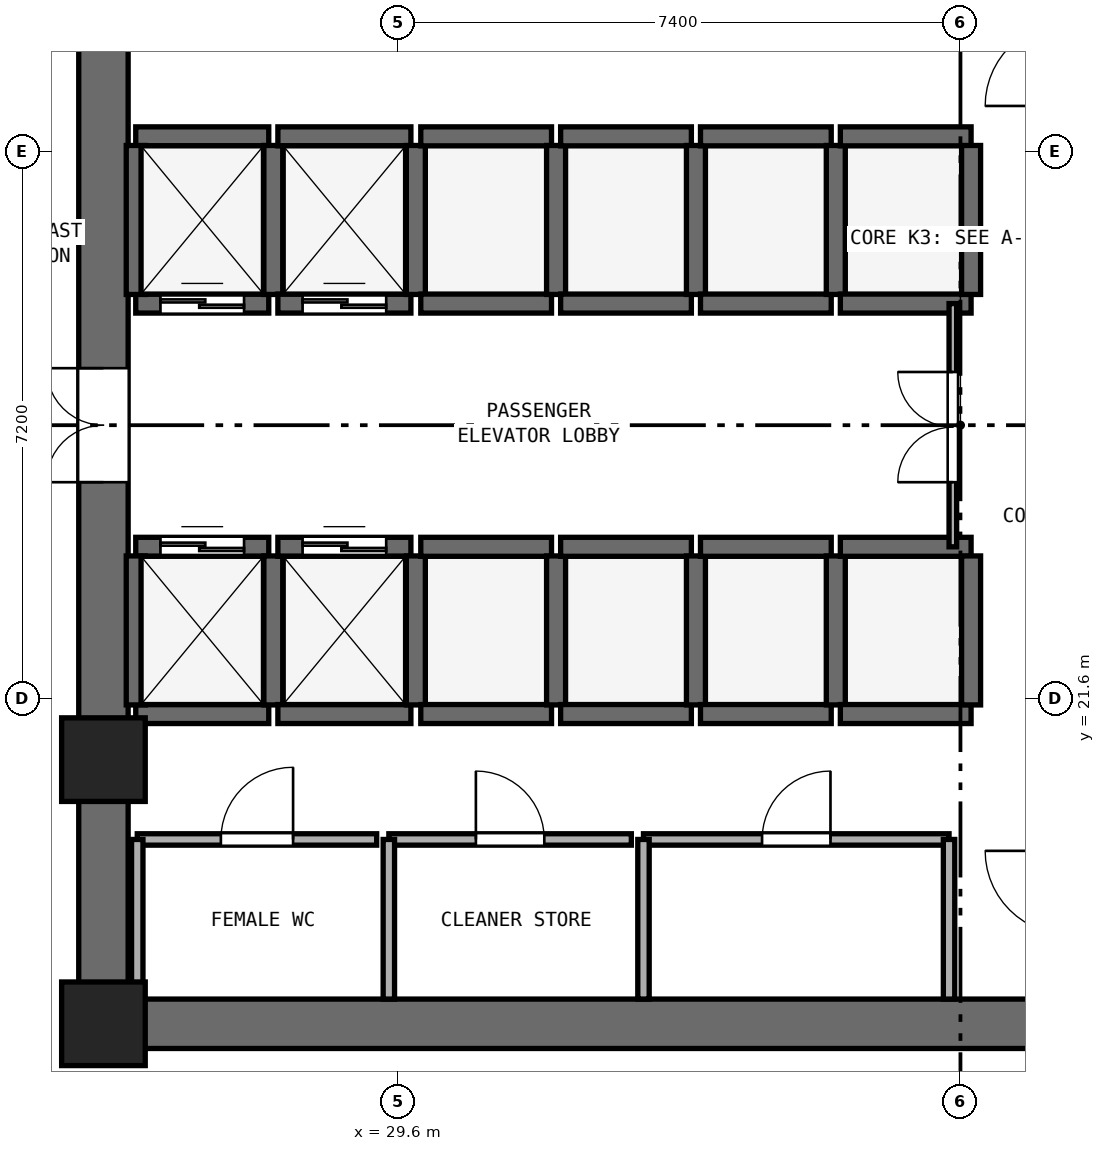
"""IFC4 building model, lengths in metres.
Left out: names, types, materials, properties, quantities, classifications, styles, units other than length and angle.
Written with IfcOpenShell. Run it as: python <this file> out.ifc"""

import sys

from ifc_helpers import new_model, si_unit, direction, frame, frame_2d, origin, origin_2d, place, context, subcontext, project, spatial, rectangle, extrude, element, fill, save


model = new_model("IFC4")
c1 = context("Model", 3, precision=1e-05, world=origin(), true_north=direction((0.0, 1.0)))
c2 = subcontext(c1, "Body", "Model", "MODEL_VIEW")
j1 = project(units=[si_unit("LENGTHUNIT", "METRE"), si_unit("PLANEANGLEUNIT", "RADIAN")], contexts=[c1])
p1 = place(None, origin())
s1 = spatial("IfcSite", under=j1, at=p1, CompositionType="ELEMENT")
p2 = place(p1, origin())
s2 = spatial("IfcBuilding", under=s1, at=p2, CompositionType="ELEMENT")
p3 = place(p2, frame((0.0, 0.0, 85.8)))
s3 = spatial("IfcBuildingStorey", under=s2, at=p3, CompositionType="ELEMENT", Elevation=85.8)
p4 = place(p3, frame((25.4, 17.325, 0.0), z_axis=(0.0, 0.0, 1.0), x_axis=(1.0, 0.0, 0.0)))
e1 = element("IfcWall", 1, at=p4, inside=s3, PredefinedType="SHEAR", context=c2, shape_type="SweptSolid", body=[
    extrude(rectangle(XDim=23.2, YDim=0.65, at=frame_2d((11.6, 0.0))), origin(), (0.0, 0.0, 1.0), 3.525),
])
p5 = place(p3, frame((25.725, 17.65, 0.0), z_axis=(0.0, 0.0, 1.0), x_axis=(0.0, 1.0, 0.0)))
e2 = element("IfcWall", 2, at=p5, inside=s3, PredefinedType="SHEAR", context=c2, shape_type="SweptSolid", body=[
    extrude(rectangle(XDim=15.1, YDim=0.65, at=frame_2d((7.55, 0.0))), origin(), (0.0, 0.0, 1.0), 3.525),
])
p6 = place(p5, frame((6.8, 0.0, 0.0)))
e3 = element("IfcOpeningElement", 3, at=p6, cuts=e2, PredefinedType="OPENING", context=c2, shape_type="SweptSolid", body=[
    extrude(rectangle(XDim=1.5, YDim=2.15, at=frame_2d((0.75, 1.075))), frame((0.0, 0.335, 0.0), z_axis=(0.0, -1.0, 0.0), x_axis=(1.0, 0.0, 0.0)), (0.0, 0.0, 1.0), 0.67),
])
for number, where, z_axis, x_axis in (
    (4, (25.725, 17.325, 0.0), (0.0, 0.0, 1.0), (1.0, 0.0, 0.0)),
    (5, (25.725, 20.8, 0.0), (0.0, 0.0, 1.0), (1.0, 0.0, 0.0)),
):
    element("IfcColumn", number, at=place(p3, frame(where, z_axis=z_axis, x_axis=x_axis)), inside=s3, PredefinedType="PILASTER", context=c2, shape_type="SweptSolid", body=[
        extrude(rectangle(XDim=1.1, YDim=1.1, at=origin_2d()), origin(), (0.0, 0.0, 1.0), 3.8),
    ])
p7 = place(p3, frame((26.15, 26.8, 0.0), z_axis=(0.0, 0.0, 1.0), x_axis=(1.0, 0.0, 0.0)))
e6 = element("IfcWall", 6, at=p7, inside=s3, PredefinedType="SHEAR", context=c2, shape_type="SweptSolid", body=[
    extrude(rectangle(XDim=1.75, YDim=0.25, at=frame_2d((0.875, 0.0))), origin(), (0.0, 0.0, 1.0), 3.525),
])
p8 = place(p7, frame((0.325, 0.0, 0.0)))
e7 = element("IfcOpeningElement", 7, at=p8, cuts=e6, PredefinedType="OPENING", context=c2, shape_type="SweptSolid", body=[
    extrude(rectangle(XDim=1.1, YDim=2.15, at=frame_2d((0.55, 1.075))), frame((0.0, 0.135, 0.0), z_axis=(0.0, -1.0, 0.0), x_axis=(1.0, 0.0, 0.0)), (0.0, 0.0, 1.0), 0.27),
])
p9 = place(p3, frame((26.15, 29.0, 0.0), z_axis=(0.0, 0.0, 1.0), x_axis=(1.0, 0.0, 0.0)))
e8 = element("IfcWall", 8, at=p9, inside=s3, PredefinedType="SHEAR", context=c2, shape_type="SweptSolid", body=[
    extrude(rectangle(XDim=1.75, YDim=0.25, at=frame_2d((0.875, 0.0))), origin(), (0.0, 0.0, 1.0), 3.525),
])
for number, where, z_axis, x_axis in (
    (9, (26.15, 26.92, 0.0), (0.0, 0.0, 1.0), (0.0, 1.0, 0.0)),
    (10, (27.96, 26.92, 0.0), (0.0, 0.0, 1.0), (0.0, 1.0, 0.0)),
):
    element("IfcWall", number, at=place(p3, frame(where, z_axis=z_axis, x_axis=x_axis)), inside=s3, PredefinedType="SHEAR", context=c2, shape_type="SweptSolid", body=[
        extrude(rectangle(XDim=1.96, YDim=0.25, at=frame_2d((0.98, 0.0))), origin(), (0.0, 0.0, 1.0), 3.525),
    ])
p10 = place(p3, frame((28.02, 26.8, 0.0), z_axis=(0.0, 0.0, 1.0), x_axis=(1.0, 0.0, 0.0)))
e11 = element("IfcWall", 11, at=p10, inside=s3, PredefinedType="SHEAR", context=c2, shape_type="SweptSolid", body=[
    extrude(rectangle(XDim=1.75, YDim=0.25, at=frame_2d((0.875, 0.0))), origin(), (0.0, 0.0, 1.0), 3.525),
])
p11 = place(p10, frame((0.325, 0.0, 0.0)))
e12 = element("IfcOpeningElement", 12, at=p11, cuts=e11, PredefinedType="OPENING", context=c2, shape_type="SweptSolid", body=[
    extrude(rectangle(XDim=1.1, YDim=2.15, at=frame_2d((0.55, 1.075))), frame((0.0, 0.135, 0.0), z_axis=(0.0, -1.0, 0.0), x_axis=(1.0, 0.0, 0.0)), (0.0, 0.0, 1.0), 0.27),
])
p12 = place(p3, frame((28.02, 29.0, 0.0), z_axis=(0.0, 0.0, 1.0), x_axis=(1.0, 0.0, 0.0)))
e13 = element("IfcWall", 13, at=p12, inside=s3, PredefinedType="SHEAR", context=c2, shape_type="SweptSolid", body=[
    extrude(rectangle(XDim=1.75, YDim=0.25, at=frame_2d((0.875, 0.0))), origin(), (0.0, 0.0, 1.0), 3.525),
])
p13 = place(p3, frame((29.835, 26.92, 0.0), z_axis=(0.0, 0.0, 1.0), x_axis=(0.0, 1.0, 0.0)))
e14 = element("IfcWall", 14, at=p13, inside=s3, PredefinedType="SHEAR", context=c2, shape_type="SweptSolid", body=[
    extrude(rectangle(XDim=1.96, YDim=0.25, at=frame_2d((0.98, 0.0))), origin(), (0.0, 0.0, 1.0), 3.525),
])
p14 = place(p3, frame((26.15, 21.4, 0.0), z_axis=(0.0, 0.0, 1.0), x_axis=(1.0, 0.0, 0.0)))
e15 = element("IfcWall", 15, at=p14, inside=s3, PredefinedType="SHEAR", context=c2, shape_type="SweptSolid", body=[
    extrude(rectangle(XDim=1.75, YDim=0.25, at=frame_2d((0.875, 0.0))), origin(), (0.0, 0.0, 1.0), 3.525),
])
p15 = place(p3, frame((26.15, 23.6, 0.0), z_axis=(0.0, 0.0, 1.0), x_axis=(1.0, 0.0, 0.0)))
e16 = element("IfcWall", 16, at=p15, inside=s3, PredefinedType="SHEAR", context=c2, shape_type="SweptSolid", body=[
    extrude(rectangle(XDim=1.75, YDim=0.25, at=frame_2d((0.875, 0.0))), origin(), (0.0, 0.0, 1.0), 3.525),
])
p16 = place(p15, frame((0.325, 0.0, 0.0)))
e17 = element("IfcOpeningElement", 17, at=p16, cuts=e16, PredefinedType="OPENING", context=c2, shape_type="SweptSolid", body=[
    extrude(rectangle(XDim=1.1, YDim=2.15, at=frame_2d((0.55, 1.075))), frame((0.0, 0.135, 0.0), z_axis=(0.0, -1.0, 0.0), x_axis=(1.0, 0.0, 0.0)), (0.0, 0.0, 1.0), 0.27),
])
for number, where, z_axis, x_axis in (
    (18, (26.15, 21.52, 0.0), (0.0, 0.0, 1.0), (0.0, 1.0, 0.0)),
    (19, (27.96, 21.52, 0.0), (0.0, 0.0, 1.0), (0.0, 1.0, 0.0)),
):
    element("IfcWall", number, at=place(p3, frame(where, z_axis=z_axis, x_axis=x_axis)), inside=s3, PredefinedType="SHEAR", context=c2, shape_type="SweptSolid", body=[
        extrude(rectangle(XDim=1.96, YDim=0.25, at=frame_2d((0.98, 0.0))), origin(), (0.0, 0.0, 1.0), 3.525),
    ])
p17 = place(p3, frame((28.02, 21.4, 0.0), z_axis=(0.0, 0.0, 1.0), x_axis=(1.0, 0.0, 0.0)))
e20 = element("IfcWall", 20, at=p17, inside=s3, PredefinedType="SHEAR", context=c2, shape_type="SweptSolid", body=[
    extrude(rectangle(XDim=1.75, YDim=0.25, at=frame_2d((0.875, 0.0))), origin(), (0.0, 0.0, 1.0), 3.525),
])
p18 = place(p3, frame((28.02, 23.6, 0.0), z_axis=(0.0, 0.0, 1.0), x_axis=(1.0, 0.0, 0.0)))
e21 = element("IfcWall", 21, at=p18, inside=s3, PredefinedType="SHEAR", context=c2, shape_type="SweptSolid", body=[
    extrude(rectangle(XDim=1.75, YDim=0.25, at=frame_2d((0.875, 0.0))), origin(), (0.0, 0.0, 1.0), 3.525),
])
p19 = place(p18, frame((0.325, 0.0, 0.0)))
e22 = element("IfcOpeningElement", 22, at=p19, cuts=e21, PredefinedType="OPENING", context=c2, shape_type="SweptSolid", body=[
    extrude(rectangle(XDim=1.1, YDim=2.15, at=frame_2d((0.55, 1.075))), frame((0.0, 0.135, 0.0), z_axis=(0.0, -1.0, 0.0), x_axis=(1.0, 0.0, 0.0)), (0.0, 0.0, 1.0), 0.27),
])
p20 = place(p3, frame((29.835, 21.52, 0.0), z_axis=(0.0, 0.0, 1.0), x_axis=(0.0, 1.0, 0.0)))
e23 = element("IfcWall", 23, at=p20, inside=s3, PredefinedType="SHEAR", context=c2, shape_type="SweptSolid", body=[
    extrude(rectangle(XDim=1.96, YDim=0.25, at=frame_2d((0.98, 0.0))), origin(), (0.0, 0.0, 1.0), 3.525),
])
for number, where, z_axis, x_axis in (
    (24, (29.9, 21.4, 0.0), (0.0, 0.0, 1.0), (1.0, 0.0, 0.0)),
    (25, (29.9, 23.6, 0.0), (0.0, 0.0, 1.0), (1.0, 0.0, 0.0)),
):
    element("IfcWall", number, at=place(p3, frame(where, z_axis=z_axis, x_axis=x_axis)), inside=s3, PredefinedType="SHEAR", context=c2, shape_type="SweptSolid", body=[
        extrude(rectangle(XDim=1.72, YDim=0.25, at=frame_2d((0.86, 0.0))), origin(), (0.0, 0.0, 1.0), 3.525),
    ])
p21 = place(p3, frame((31.68, 21.52, 0.0), z_axis=(0.0, 0.0, 1.0), x_axis=(0.0, 1.0, 0.0)))
e26 = element("IfcWall", 26, at=p21, inside=s3, PredefinedType="SHEAR", context=c2, shape_type="SweptSolid", body=[
    extrude(rectangle(XDim=1.96, YDim=0.25, at=frame_2d((0.98, 0.0))), origin(), (0.0, 0.0, 1.0), 3.525),
])
for number, where, z_axis, x_axis in (
    (27, (31.74, 21.4, 0.0), (0.0, 0.0, 1.0), (1.0, 0.0, 0.0)),
    (28, (31.74, 23.6, 0.0), (0.0, 0.0, 1.0), (1.0, 0.0, 0.0)),
):
    element("IfcWall", number, at=place(p3, frame(where, z_axis=z_axis, x_axis=x_axis)), inside=s3, PredefinedType="SHEAR", context=c2, shape_type="SweptSolid", body=[
        extrude(rectangle(XDim=1.72, YDim=0.25, at=frame_2d((0.86, 0.0))), origin(), (0.0, 0.0, 1.0), 3.525),
    ])
p22 = place(p3, frame((33.52, 21.52, 0.0), z_axis=(0.0, 0.0, 1.0), x_axis=(0.0, 1.0, 0.0)))
e29 = element("IfcWall", 29, at=p22, inside=s3, PredefinedType="SHEAR", context=c2, shape_type="SweptSolid", body=[
    extrude(rectangle(XDim=1.96, YDim=0.25, at=frame_2d((0.98, 0.0))), origin(), (0.0, 0.0, 1.0), 3.525),
])
for number, where, z_axis, x_axis in (
    (30, (33.58, 21.4, 0.0), (0.0, 0.0, 1.0), (1.0, 0.0, 0.0)),
    (31, (33.58, 23.6, 0.0), (0.0, 0.0, 1.0), (1.0, 0.0, 0.0)),
):
    element("IfcWall", number, at=place(p3, frame(where, z_axis=z_axis, x_axis=x_axis)), inside=s3, PredefinedType="SHEAR", context=c2, shape_type="SweptSolid", body=[
        extrude(rectangle(XDim=1.72, YDim=0.25, at=frame_2d((0.86, 0.0))), origin(), (0.0, 0.0, 1.0), 3.525),
    ])
p23 = place(p3, frame((35.36, 21.52, 0.0), z_axis=(0.0, 0.0, 1.0), x_axis=(0.0, 1.0, 0.0)))
e32 = element("IfcWall", 32, at=p23, inside=s3, PredefinedType="SHEAR", context=c2, shape_type="SweptSolid", body=[
    extrude(rectangle(XDim=1.96, YDim=0.25, at=frame_2d((0.98, 0.0))), origin(), (0.0, 0.0, 1.0), 3.525),
])
for number, where, z_axis, x_axis in (
    (33, (35.42, 21.4, 0.0), (0.0, 0.0, 1.0), (1.0, 0.0, 0.0)),
    (34, (35.42, 23.6, 0.0), (0.0, 0.0, 1.0), (1.0, 0.0, 0.0)),
):
    element("IfcWall", number, at=place(p3, frame(where, z_axis=z_axis, x_axis=x_axis)), inside=s3, PredefinedType="SHEAR", context=c2, shape_type="SweptSolid", body=[
        extrude(rectangle(XDim=1.72, YDim=0.25, at=frame_2d((0.86, 0.0))), origin(), (0.0, 0.0, 1.0), 3.525),
    ])
p24 = place(p3, frame((37.14, 21.52, 0.0), z_axis=(0.0, 0.0, 1.0), x_axis=(0.0, 1.0, 0.0)))
e35 = element("IfcWall", 35, at=p24, inside=s3, PredefinedType="SHEAR", context=c2, shape_type="SweptSolid", body=[
    extrude(rectangle(XDim=1.96, YDim=0.25, at=frame_2d((0.98, 0.0))), origin(), (0.0, 0.0, 1.0), 3.525),
])
for number, where, z_axis, x_axis in (
    (36, (29.9, 26.8, 0.0), (0.0, 0.0, 1.0), (1.0, 0.0, 0.0)),
    (37, (29.9, 29.0, 0.0), (0.0, 0.0, 1.0), (1.0, 0.0, 0.0)),
):
    element("IfcWall", number, at=place(p3, frame(where, z_axis=z_axis, x_axis=x_axis)), inside=s3, PredefinedType="SHEAR", context=c2, shape_type="SweptSolid", body=[
        extrude(rectangle(XDim=1.72, YDim=0.25, at=frame_2d((0.86, 0.0))), origin(), (0.0, 0.0, 1.0), 3.525),
    ])
p25 = place(p3, frame((31.68, 26.92, 0.0), z_axis=(0.0, 0.0, 1.0), x_axis=(0.0, 1.0, 0.0)))
e38 = element("IfcWall", 38, at=p25, inside=s3, PredefinedType="SHEAR", context=c2, shape_type="SweptSolid", body=[
    extrude(rectangle(XDim=1.96, YDim=0.25, at=frame_2d((0.98, 0.0))), origin(), (0.0, 0.0, 1.0), 3.525),
])
for number, where, z_axis, x_axis in (
    (39, (31.74, 26.8, 0.0), (0.0, 0.0, 1.0), (1.0, 0.0, 0.0)),
    (40, (31.74, 29.0, 0.0), (0.0, 0.0, 1.0), (1.0, 0.0, 0.0)),
):
    element("IfcWall", number, at=place(p3, frame(where, z_axis=z_axis, x_axis=x_axis)), inside=s3, PredefinedType="SHEAR", context=c2, shape_type="SweptSolid", body=[
        extrude(rectangle(XDim=1.72, YDim=0.25, at=frame_2d((0.86, 0.0))), origin(), (0.0, 0.0, 1.0), 3.525),
    ])
p26 = place(p3, frame((33.52, 26.92, 0.0), z_axis=(0.0, 0.0, 1.0), x_axis=(0.0, 1.0, 0.0)))
e41 = element("IfcWall", 41, at=p26, inside=s3, PredefinedType="SHEAR", context=c2, shape_type="SweptSolid", body=[
    extrude(rectangle(XDim=1.96, YDim=0.25, at=frame_2d((0.98, 0.0))), origin(), (0.0, 0.0, 1.0), 3.525),
])
for number, where, z_axis, x_axis in (
    (42, (33.58, 26.8, 0.0), (0.0, 0.0, 1.0), (1.0, 0.0, 0.0)),
    (43, (33.58, 29.0, 0.0), (0.0, 0.0, 1.0), (1.0, 0.0, 0.0)),
):
    element("IfcWall", number, at=place(p3, frame(where, z_axis=z_axis, x_axis=x_axis)), inside=s3, PredefinedType="SHEAR", context=c2, shape_type="SweptSolid", body=[
        extrude(rectangle(XDim=1.72, YDim=0.25, at=frame_2d((0.86, 0.0))), origin(), (0.0, 0.0, 1.0), 3.525),
    ])
p27 = place(p3, frame((35.36, 26.92, 0.0), z_axis=(0.0, 0.0, 1.0), x_axis=(0.0, 1.0, 0.0)))
e44 = element("IfcWall", 44, at=p27, inside=s3, PredefinedType="SHEAR", context=c2, shape_type="SweptSolid", body=[
    extrude(rectangle(XDim=1.96, YDim=0.25, at=frame_2d((0.98, 0.0))), origin(), (0.0, 0.0, 1.0), 3.525),
])
for number, where, z_axis, x_axis in (
    (45, (35.42, 26.8, 0.0), (0.0, 0.0, 1.0), (1.0, 0.0, 0.0)),
    (46, (35.42, 29.0, 0.0), (0.0, 0.0, 1.0), (1.0, 0.0, 0.0)),
):
    element("IfcWall", number, at=place(p3, frame(where, z_axis=z_axis, x_axis=x_axis)), inside=s3, PredefinedType="SHEAR", context=c2, shape_type="SweptSolid", body=[
        extrude(rectangle(XDim=1.72, YDim=0.25, at=frame_2d((0.86, 0.0))), origin(), (0.0, 0.0, 1.0), 3.525),
    ])
p28 = place(p3, frame((37.14, 26.92, 0.0), z_axis=(0.0, 0.0, 1.0), x_axis=(0.0, 1.0, 0.0)))
e47 = element("IfcWall", 47, at=p28, inside=s3, PredefinedType="SHEAR", context=c2, shape_type="SweptSolid", body=[
    extrude(rectangle(XDim=1.96, YDim=0.25, at=frame_2d((0.98, 0.0))), origin(), (0.0, 0.0, 1.0), 3.525),
])
p29 = place(p3, frame((26.17, 19.75, 0.0), z_axis=(0.0, 0.0, 1.0), x_axis=(1.0, 0.0, 0.0)))
e48 = element("IfcWall", 48, at=p29, inside=s3, PredefinedType="PARTITIONING", context=c2, shape_type="SweptSolid", body=[
    extrude(rectangle(XDim=3.15, YDim=0.15, at=frame_2d((1.575, 0.0))), origin(), (0.0, 0.0, 1.0), 3.525),
])
p30 = place(p29, frame((1.1, 0.0, 0.0)))
e49 = element("IfcOpeningElement", 49, at=p30, cuts=e48, PredefinedType="OPENING", context=c2, shape_type="SweptSolid", body=[
    extrude(rectangle(XDim=0.95, YDim=2.1, at=frame_2d((0.475, 1.05))), frame((0.0, 0.085, 0.0), z_axis=(0.0, -1.0, 0.0), x_axis=(1.0, 0.0, 0.0)), (0.0, 0.0, 1.0), 0.17),
])
p31 = place(p3, frame((26.17, 17.65, 0.0), z_axis=(0.0, 0.0, 1.0), x_axis=(0.0, 1.0, 0.0)))
e50 = element("IfcWall", 50, at=p31, inside=s3, PredefinedType="PARTITIONING", context=c2, shape_type="SweptSolid", body=[
    extrude(rectangle(XDim=2.1, YDim=0.15, at=frame_2d((1.05, 0.0))), origin(), (0.0, 0.0, 1.0), 3.525),
])
p32 = place(p3, frame((29.48, 19.75, 0.0), z_axis=(0.0, 0.0, 1.0), x_axis=(1.0, 0.0, 0.0)))
e51 = element("IfcWall", 51, at=p32, inside=s3, PredefinedType="PARTITIONING", context=c2, shape_type="SweptSolid", body=[
    extrude(rectangle(XDim=3.19, YDim=0.15, at=frame_2d((1.595, 0.0))), origin(), (0.0, 0.0, 1.0), 3.525),
])
p33 = place(p32, frame((1.145, 0.0, 0.0)))
e52 = element("IfcOpeningElement", 52, at=p33, cuts=e51, PredefinedType="OPENING", context=c2, shape_type="SweptSolid", body=[
    extrude(rectangle(XDim=0.9, YDim=2.1, at=frame_2d((0.45, 1.05))), frame((0.0, 0.085, 0.0), z_axis=(0.0, -1.0, 0.0), x_axis=(1.0, 0.0, 0.0)), (0.0, 0.0, 1.0), 0.17),
])
p34 = place(p3, frame((29.48, 17.65, 0.0), z_axis=(0.0, 0.0, 1.0), x_axis=(0.0, 1.0, 0.0)))
e53 = element("IfcWall", 53, at=p34, inside=s3, PredefinedType="PARTITIONING", context=c2, shape_type="SweptSolid", body=[
    extrude(rectangle(XDim=2.1, YDim=0.15, at=frame_2d((1.05, 0.0))), origin(), (0.0, 0.0, 1.0), 3.525),
])
p35 = place(p3, frame((32.83, 19.75, 0.0), z_axis=(0.0, 0.0, 1.0), x_axis=(1.0, 0.0, 0.0)))
e54 = element("IfcWall", 54, at=p35, inside=s3, PredefinedType="PARTITIONING", context=c2, shape_type="SweptSolid", body=[
    extrude(rectangle(XDim=4.02, YDim=0.15, at=frame_2d((2.01, 0.0))), origin(), (0.0, 0.0, 1.0), 3.525),
])
p36 = place(p35, frame((1.56, 0.0, 0.0)))
e55 = element("IfcOpeningElement", 55, at=p36, cuts=e54, PredefinedType="OPENING", context=c2, shape_type="SweptSolid", body=[
    extrude(rectangle(XDim=0.9, YDim=2.1, at=frame_2d((0.45, 1.05))), frame((0.0, 0.085, 0.0), z_axis=(0.0, -1.0, 0.0), x_axis=(1.0, 0.0, 0.0)), (0.0, 0.0, 1.0), 0.17),
])
for number, where, z_axis, x_axis in (
    (56, (32.83, 17.65, 0.0), (0.0, 0.0, 1.0), (0.0, 1.0, 0.0)),
    (57, (36.85, 17.65, 0.0), (0.0, 0.0, 1.0), (0.0, 1.0, 0.0)),
):
    element("IfcWall", number, at=place(p3, frame(where, z_axis=z_axis, x_axis=x_axis)), inside=s3, PredefinedType="PARTITIONING", context=c2, shape_type="SweptSolid", body=[
        extrude(rectangle(XDim=2.1, YDim=0.15, at=frame_2d((1.05, 0.0))), origin(), (0.0, 0.0, 1.0), 3.525),
    ])
p37 = place(p3, frame((36.9, 23.6, 0.0), z_axis=(0.0, 0.0, 1.0), x_axis=(0.0, 1.0, 0.0)))
e58 = element("IfcWall", 58, at=p37, inside=s3, PredefinedType="PARTITIONING", context=c2, shape_type="SweptSolid", body=[
    extrude(rectangle(XDim=3.2, YDim=0.1, at=frame_2d((1.6, 0.0))), origin(), (0.0, 0.0, 1.0), 3.525),
])
p38 = place(p37, frame((0.85, 0.0, 0.0)))
e59 = element("IfcOpeningElement", 59, at=p38, cuts=e58, PredefinedType="OPENING", context=c2, shape_type="SweptSolid", body=[
    extrude(rectangle(XDim=1.45, YDim=2.12, at=frame_2d((0.725, 1.06))), frame((0.0, 0.06, 0.0), z_axis=(0.0, -1.0, 0.0), x_axis=(1.0, 0.0, 0.0)), (0.0, 0.0, 1.0), 0.12),
])
p39 = place(p8, origin())
e60 = element("IfcDoor", 60, at=p39, inside=s3, OperationType="DOUBLE_DOOR_SLIDING", PredefinedType="DOOR", context=c2, shape_type="SweptSolid", body=[
    extrude(rectangle(XDim=1.1, YDim=2.15, at=frame_2d((0.55, 1.075))), frame((0.0, 0.025, 0.0), z_axis=(0.0, -1.0, 0.0), x_axis=(1.0, 0.0, 0.0)), (0.0, 0.0, 1.0), 0.05),
])
fill(e7, e60)
p40 = place(p11, origin())
e61 = element("IfcDoor", 61, at=p40, inside=s3, OperationType="DOUBLE_DOOR_SLIDING", PredefinedType="DOOR", context=c2, shape_type="SweptSolid", body=[
    extrude(rectangle(XDim=1.1, YDim=2.15, at=frame_2d((0.55, 1.075))), frame((0.0, 0.025, 0.0), z_axis=(0.0, -1.0, 0.0), x_axis=(1.0, 0.0, 0.0)), (0.0, 0.0, 1.0), 0.05),
])
fill(e12, e61)
p41 = place(p16, origin())
e62 = element("IfcDoor", 62, at=p41, inside=s3, OperationType="DOUBLE_DOOR_SLIDING", PredefinedType="DOOR", context=c2, shape_type="SweptSolid", body=[
    extrude(rectangle(XDim=1.1, YDim=2.15, at=frame_2d((0.55, 1.075))), frame((0.0, 0.025, 0.0), z_axis=(0.0, -1.0, 0.0), x_axis=(1.0, 0.0, 0.0)), (0.0, 0.0, 1.0), 0.05),
])
fill(e17, e62)
p42 = place(p19, origin())
e63 = element("IfcDoor", 63, at=p42, inside=s3, OperationType="DOUBLE_DOOR_SLIDING", PredefinedType="DOOR", context=c2, shape_type="SweptSolid", body=[
    extrude(rectangle(XDim=1.1, YDim=2.15, at=frame_2d((0.55, 1.075))), frame((0.0, 0.025, 0.0), z_axis=(0.0, -1.0, 0.0), x_axis=(1.0, 0.0, 0.0)), (0.0, 0.0, 1.0), 0.05),
])
fill(e22, e63)
p43 = place(p6, origin())
e64 = element("IfcDoor", 64, at=p43, inside=s3, OperationType="DOUBLE_DOOR_SINGLE_SWING", PredefinedType="DOOR", context=c2, shape_type="SweptSolid", body=[
    extrude(rectangle(XDim=1.5, YDim=2.15, at=frame_2d((0.75, 1.075))), frame((0.0, 0.025, 0.0), z_axis=(0.0, -1.0, 0.0), x_axis=(1.0, 0.0, 0.0)), (0.0, 0.0, 1.0), 0.05),
])
fill(e3, e64)
p44 = place(p30, origin())
e65 = element("IfcDoor", 65, at=p44, inside=s3, OperationType="SINGLE_SWING_RIGHT", PredefinedType="DOOR", context=c2, shape_type="SweptSolid", body=[
    extrude(rectangle(XDim=0.95, YDim=2.1, at=frame_2d((0.475, 1.05))), frame((0.0, 0.025, 0.0), z_axis=(0.0, -1.0, 0.0), x_axis=(1.0, 0.0, 0.0)), (0.0, 0.0, 1.0), 0.05),
])
fill(e49, e65)
p45 = place(p33, origin())
e66 = element("IfcDoor", 66, at=p45, inside=s3, OperationType="SINGLE_SWING_LEFT", PredefinedType="DOOR", context=c2, shape_type="SweptSolid", body=[
    extrude(rectangle(XDim=0.9, YDim=2.1, at=frame_2d((0.45, 1.05))), frame((0.0, 0.025, 0.0), z_axis=(0.0, -1.0, 0.0), x_axis=(1.0, 0.0, 0.0)), (0.0, 0.0, 1.0), 0.05),
])
fill(e52, e66)
p46 = place(p36, origin())
e67 = element("IfcDoor", 67, at=p46, inside=s3, OperationType="SINGLE_SWING_RIGHT", PredefinedType="DOOR", context=c2, shape_type="SweptSolid", body=[
    extrude(rectangle(XDim=0.9, YDim=2.1, at=frame_2d((0.45, 1.05))), frame((0.0, 0.025, 0.0), z_axis=(0.0, -1.0, 0.0), x_axis=(1.0, 0.0, 0.0)), (0.0, 0.0, 1.0), 0.05),
])
fill(e55, e67)
p47 = place(p38, origin())
e68 = element("IfcDoor", 68, at=p47, inside=s3, OperationType="DOUBLE_DOOR_SINGLE_SWING", PredefinedType="DOOR", context=c2, shape_type="SweptSolid", body=[
    extrude(rectangle(XDim=1.45, YDim=2.12, at=frame_2d((0.725, 1.06))), frame((0.0, 0.025, 0.0), z_axis=(0.0, -1.0, 0.0), x_axis=(1.0, 0.0, 0.0)), (0.0, 0.0, 1.0), 0.05),
])
fill(e59, e68)
save(model, sys.argv[1])
